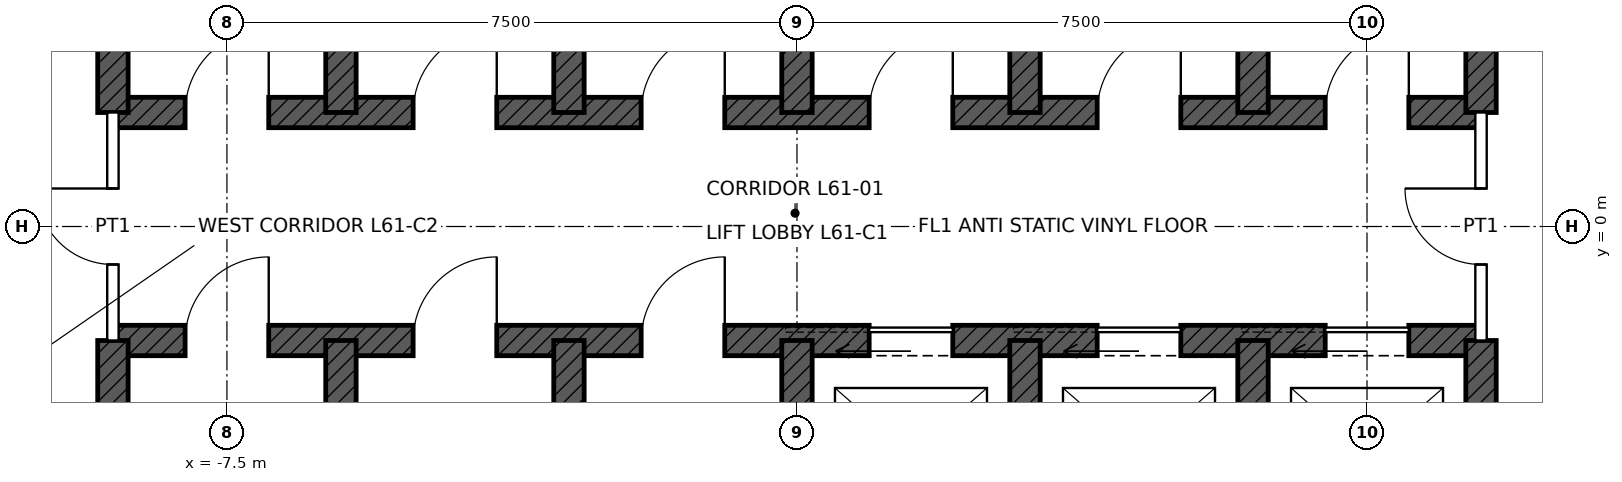
"""IFC4 building model, lengths in metres.
Left out: names, types, materials, properties, quantities, classifications, styles, units other than length and angle.
Written with IfcOpenShell. Run it as: python <this file> out.ifc"""

import sys

from ifc_helpers import new_model, si_unit, direction, frame, frame_2d, origin, place, context, subcontext, project, spatial, rectangle, extrude, element, fill, save


model = new_model("IFC4")
c1 = context("Model", 3, precision=1e-05, world=origin(), true_north=direction((0.0, 1.0)))
c2 = subcontext(c1, "Body", "Model", "MODEL_VIEW")
j1 = project(units=[si_unit("LENGTHUNIT", "METRE"), si_unit("PLANEANGLEUNIT", "RADIAN")], contexts=[c1])
p1 = place(None, origin())
s1 = spatial("IfcSite", under=j1, at=p1, CompositionType="ELEMENT")
p2 = place(p1, origin())
s2 = spatial("IfcBuilding", under=s1, at=p2, CompositionType="ELEMENT")
p3 = place(p2, frame((0.0, 0.0, 279.9)))
s3 = spatial("IfcBuildingStorey", under=s2, at=p3, CompositionType="ELEMENT", Elevation=279.9)
p4 = place(p3, frame((-9.0, 1.5, 0.0), z_axis=(0.0, 0.0, 1.0), x_axis=(1.0, 0.0, 0.0)))
e1 = element("IfcWall", 1, at=p4, inside=s3, PredefinedType="SHEAR", context=c2, shape_type="SweptSolid", body=[
    extrude(rectangle(XDim=18.0, YDim=0.4, at=frame_2d((9.0, 0.0))), origin(), (0.0, 0.0, 1.0), 4.0),
])
p5 = place(p4, frame((0.95, 0.0, 0.0)))
e2 = element("IfcOpeningElement", 2, at=p5, cuts=e1, PredefinedType="OPENING", context=c2, shape_type="SweptSolid", body=[
    extrude(rectangle(XDim=1.1, YDim=2.1, at=frame_2d((0.55, 1.05))), frame((0.0, 0.21, 0.0), z_axis=(0.0, -1.0, 0.0), x_axis=(1.0, 0.0, 0.0)), (0.0, 0.0, 1.0), 0.42),
])
p6 = place(p4, frame((3.95, 0.0, 0.0)))
e3 = element("IfcOpeningElement", 3, at=p6, cuts=e1, PredefinedType="OPENING", context=c2, shape_type="SweptSolid", body=[
    extrude(rectangle(XDim=1.1, YDim=2.1, at=frame_2d((0.55, 1.05))), frame((0.0, 0.21, 0.0), z_axis=(0.0, -1.0, 0.0), x_axis=(1.0, 0.0, 0.0)), (0.0, 0.0, 1.0), 0.42),
])
p7 = place(p4, frame((6.95, 0.0, 0.0)))
e4 = element("IfcOpeningElement", 4, at=p7, cuts=e1, PredefinedType="OPENING", context=c2, shape_type="SweptSolid", body=[
    extrude(rectangle(XDim=1.1, YDim=2.1, at=frame_2d((0.55, 1.05))), frame((0.0, 0.21, 0.0), z_axis=(0.0, -1.0, 0.0), x_axis=(1.0, 0.0, 0.0)), (0.0, 0.0, 1.0), 0.42),
])
p8 = place(p4, frame((9.95, 0.0, 0.0)))
e5 = element("IfcOpeningElement", 5, at=p8, cuts=e1, PredefinedType="OPENING", context=c2, shape_type="SweptSolid", body=[
    extrude(rectangle(XDim=1.1, YDim=2.1, at=frame_2d((0.55, 1.05))), frame((0.0, 0.21, 0.0), z_axis=(0.0, -1.0, 0.0), x_axis=(1.0, 0.0, 0.0)), (0.0, 0.0, 1.0), 0.42),
])
p9 = place(p4, frame((12.95, 0.0, 0.0)))
e6 = element("IfcOpeningElement", 6, at=p9, cuts=e1, PredefinedType="OPENING", context=c2, shape_type="SweptSolid", body=[
    extrude(rectangle(XDim=1.1, YDim=2.1, at=frame_2d((0.55, 1.05))), frame((0.0, 0.21, 0.0), z_axis=(0.0, -1.0, 0.0), x_axis=(1.0, 0.0, 0.0)), (0.0, 0.0, 1.0), 0.42),
])
p10 = place(p4, frame((15.95, 0.0, 0.0)))
e7 = element("IfcOpeningElement", 7, at=p10, cuts=e1, PredefinedType="OPENING", context=c2, shape_type="SweptSolid", body=[
    extrude(rectangle(XDim=1.1, YDim=2.1, at=frame_2d((0.55, 1.05))), frame((0.0, 0.21, 0.0), z_axis=(0.0, -1.0, 0.0), x_axis=(1.0, 0.0, 0.0)), (0.0, 0.0, 1.0), 0.42),
])
p11 = place(p3, frame((-9.0, -1.5, 0.0), z_axis=(0.0, 0.0, 1.0), x_axis=(1.0, 0.0, 0.0)))
e8 = element("IfcWall", 8, at=p11, inside=s3, PredefinedType="SHEAR", context=c2, shape_type="SweptSolid", body=[
    extrude(rectangle(XDim=18.0, YDim=0.4, at=frame_2d((9.0, 0.0))), origin(), (0.0, 0.0, 1.0), 4.0),
])
p12 = place(p11, frame((9.95, 0.0, 0.0)))
e9 = element("IfcOpeningElement", 9, at=p12, cuts=e8, PredefinedType="OPENING", context=c2, shape_type="SweptSolid", body=[
    extrude(rectangle(XDim=1.1, YDim=2.1, at=frame_2d((0.55, 1.05))), frame((0.0, 0.21, 0.0), z_axis=(0.0, -1.0, 0.0), x_axis=(1.0, 0.0, 0.0)), (0.0, 0.0, 1.0), 0.42),
])
p13 = place(p11, frame((12.95, 0.0, 0.0)))
e10 = element("IfcOpeningElement", 10, at=p13, cuts=e8, PredefinedType="OPENING", context=c2, shape_type="SweptSolid", body=[
    extrude(rectangle(XDim=1.1, YDim=2.1, at=frame_2d((0.55, 1.05))), frame((0.0, 0.21, 0.0), z_axis=(0.0, -1.0, 0.0), x_axis=(1.0, 0.0, 0.0)), (0.0, 0.0, 1.0), 0.42),
])
p14 = place(p11, frame((15.95, 0.0, 0.0)))
e11 = element("IfcOpeningElement", 11, at=p14, cuts=e8, PredefinedType="OPENING", context=c2, shape_type="SweptSolid", body=[
    extrude(rectangle(XDim=1.1, YDim=2.1, at=frame_2d((0.55, 1.05))), frame((0.0, 0.21, 0.0), z_axis=(0.0, -1.0, 0.0), x_axis=(1.0, 0.0, 0.0)), (0.0, 0.0, 1.0), 0.42),
])
p15 = place(p11, frame((0.95, 0.0, 0.0)))
e12 = element("IfcOpeningElement", 12, at=p15, cuts=e8, PredefinedType="OPENING", context=c2, shape_type="SweptSolid", body=[
    extrude(rectangle(XDim=1.1, YDim=2.1, at=frame_2d((0.55, 1.05))), frame((0.0, 0.21, 0.0), z_axis=(0.0, -1.0, 0.0), x_axis=(1.0, 0.0, 0.0)), (0.0, 0.0, 1.0), 0.42),
])
p16 = place(p11, frame((3.95, 0.0, 0.0)))
e13 = element("IfcOpeningElement", 13, at=p16, cuts=e8, PredefinedType="OPENING", context=c2, shape_type="SweptSolid", body=[
    extrude(rectangle(XDim=1.1, YDim=2.1, at=frame_2d((0.55, 1.05))), frame((0.0, 0.21, 0.0), z_axis=(0.0, -1.0, 0.0), x_axis=(1.0, 0.0, 0.0)), (0.0, 0.0, 1.0), 0.42),
])
p17 = place(p11, frame((6.95, 0.0, 0.0)))
e14 = element("IfcOpeningElement", 14, at=p17, cuts=e8, PredefinedType="OPENING", context=c2, shape_type="SweptSolid", body=[
    extrude(rectangle(XDim=1.1, YDim=2.1, at=frame_2d((0.55, 1.05))), frame((0.0, 0.21, 0.0), z_axis=(0.0, -1.0, 0.0), x_axis=(1.0, 0.0, 0.0)), (0.0, 0.0, 1.0), 0.42),
])
for number, where, z_axis, x_axis in (
    (15, (-9.0, 1.5, 0.0), (0.0, 0.0, 1.0), (0.0, 1.0, 0.0)),
    (16, (9.0, 1.5, 0.0), (0.0, 0.0, 1.0), (0.0, 1.0, 0.0)),
    (17, (-9.0, -4.5, 0.0), (0.0, 0.0, 1.0), (0.0, 1.0, 0.0)),
    (18, (9.0, -4.5, 0.0), (0.0, 0.0, 1.0), (0.0, 1.0, 0.0)),
    (19, (-6.0, 1.5, 0.0), (0.0, 0.0, 1.0), (0.0, 1.0, 0.0)),
    (20, (-3.0, 1.5, 0.0), (0.0, 0.0, 1.0), (0.0, 1.0, 0.0)),
    (21, (0.0, 1.5, 0.0), (0.0, 0.0, 1.0), (0.0, 1.0, 0.0)),
    (22, (3.0, 1.5, 0.0), (0.0, 0.0, 1.0), (0.0, 1.0, 0.0)),
    (23, (6.0, 1.5, 0.0), (0.0, 0.0, 1.0), (0.0, 1.0, 0.0)),
    (24, (-6.0, -4.5, 0.0), (0.0, 0.0, 1.0), (0.0, 1.0, 0.0)),
    (25, (-3.0, -4.5, 0.0), (0.0, 0.0, 1.0), (0.0, 1.0, 0.0)),
    (26, (0.0, -4.5, 0.0), (0.0, 0.0, 1.0), (0.0, 1.0, 0.0)),
    (27, (3.0, -4.5, 0.0), (0.0, 0.0, 1.0), (0.0, 1.0, 0.0)),
    (28, (6.0, -4.5, 0.0), (0.0, 0.0, 1.0), (0.0, 1.0, 0.0)),
):
    element("IfcWall", number, at=place(p3, frame(where, z_axis=z_axis, x_axis=x_axis)), inside=s3, PredefinedType="SHEAR", context=c2, shape_type="SweptSolid", body=[
        extrude(rectangle(XDim=3.0, YDim=0.4, at=frame_2d((1.5, 0.0))), origin(), (0.0, 0.0, 1.0), 4.0),
    ])
p18 = place(p3, frame((-9.0, -1.5, 0.0), z_axis=(0.0, 0.0, 1.0), x_axis=(0.0, 1.0, 0.0)))
e29 = element("IfcWall", 29, at=p18, inside=s3, PredefinedType="PARTITIONING", context=c2, shape_type="SweptSolid", body=[
    extrude(rectangle(XDim=3.0, YDim=0.15, at=frame_2d((1.5, 0.0))), origin(), (0.0, 0.0, 1.0), 3.75),
])
p19 = place(p18, frame((1.0, 0.0, 0.0)))
e30 = element("IfcOpeningElement", 30, at=p19, cuts=e29, PredefinedType="OPENING", context=c2, shape_type="SweptSolid", body=[
    extrude(rectangle(XDim=1.0, YDim=2.4, at=frame_2d((0.5, 1.2))), frame((0.0, 0.085, 0.0), z_axis=(0.0, -1.0, 0.0), x_axis=(1.0, 0.0, 0.0)), (0.0, 0.0, 1.0), 0.17),
])
p20 = place(p3, frame((9.0, -1.5, 0.0), z_axis=(0.0, 0.0, 1.0), x_axis=(0.0, 1.0, 0.0)))
e31 = element("IfcWall", 31, at=p20, inside=s3, PredefinedType="PARTITIONING", context=c2, shape_type="SweptSolid", body=[
    extrude(rectangle(XDim=3.0, YDim=0.15, at=frame_2d((1.5, 0.0))), origin(), (0.0, 0.0, 1.0), 3.75),
])
p21 = place(p20, frame((1.0, 0.0, 0.0)))
e32 = element("IfcOpeningElement", 32, at=p21, cuts=e31, PredefinedType="OPENING", context=c2, shape_type="SweptSolid", body=[
    extrude(rectangle(XDim=1.0, YDim=2.4, at=frame_2d((0.5, 1.2))), frame((0.0, 0.085, 0.0), z_axis=(0.0, -1.0, 0.0), x_axis=(1.0, 0.0, 0.0)), (0.0, 0.0, 1.0), 0.17),
])
p22 = place(p12, origin())
e33 = element("IfcDoor", 33, at=p22, inside=s3, OperationType="SLIDING_TO_LEFT", PredefinedType="DOOR", context=c2, shape_type="SweptSolid", body=[
    extrude(rectangle(XDim=1.1, YDim=2.1, at=frame_2d((0.55, 1.05))), frame((0.0, 0.025, 0.0), z_axis=(0.0, -1.0, 0.0), x_axis=(1.0, 0.0, 0.0)), (0.0, 0.0, 1.0), 0.05),
])
fill(e9, e33)
p23 = place(p13, origin())
e34 = element("IfcDoor", 34, at=p23, inside=s3, OperationType="SLIDING_TO_LEFT", PredefinedType="DOOR", context=c2, shape_type="SweptSolid", body=[
    extrude(rectangle(XDim=1.1, YDim=2.1, at=frame_2d((0.55, 1.05))), frame((0.0, 0.025, 0.0), z_axis=(0.0, -1.0, 0.0), x_axis=(1.0, 0.0, 0.0)), (0.0, 0.0, 1.0), 0.05),
])
fill(e10, e34)
p24 = place(p14, origin())
e35 = element("IfcDoor", 35, at=p24, inside=s3, OperationType="SLIDING_TO_LEFT", PredefinedType="DOOR", context=c2, shape_type="SweptSolid", body=[
    extrude(rectangle(XDim=1.1, YDim=2.1, at=frame_2d((0.55, 1.05))), frame((0.0, 0.025, 0.0), z_axis=(0.0, -1.0, 0.0), x_axis=(1.0, 0.0, 0.0)), (0.0, 0.0, 1.0), 0.05),
])
fill(e11, e35)
p25 = place(p19, origin())
e36 = element("IfcDoor", 36, at=p25, inside=s3, OperationType="SINGLE_SWING_RIGHT", PredefinedType="DOOR", context=c2, shape_type="SweptSolid", body=[
    extrude(rectangle(XDim=1.0, YDim=2.4, at=frame_2d((0.5, 1.2))), frame((0.0, 0.025, 0.0), z_axis=(0.0, -1.0, 0.0), x_axis=(1.0, 0.0, 0.0)), (0.0, 0.0, 1.0), 0.05),
])
fill(e30, e36)
p26 = place(p21, origin())
e37 = element("IfcDoor", 37, at=p26, inside=s3, OperationType="SINGLE_SWING_RIGHT", PredefinedType="DOOR", context=c2, shape_type="SweptSolid", body=[
    extrude(rectangle(XDim=1.0, YDim=2.4, at=frame_2d((0.5, 1.2))), frame((0.0, 0.025, 0.0), z_axis=(0.0, -1.0, 0.0), x_axis=(1.0, 0.0, 0.0)), (0.0, 0.0, 1.0), 0.05),
])
fill(e32, e37)
p27 = place(p5, origin())
e38 = element("IfcDoor", 38, at=p27, inside=s3, OperationType="SINGLE_SWING_RIGHT", PredefinedType="DOOR", context=c2, shape_type="SweptSolid", body=[
    extrude(rectangle(XDim=1.1, YDim=2.1, at=frame_2d((0.55, 1.05))), frame((0.0, 0.025, 0.0), z_axis=(0.0, -1.0, 0.0), x_axis=(1.0, 0.0, 0.0)), (0.0, 0.0, 1.0), 0.05),
])
fill(e2, e38)
p28 = place(p6, origin())
e39 = element("IfcDoor", 39, at=p28, inside=s3, OperationType="SINGLE_SWING_RIGHT", PredefinedType="DOOR", context=c2, shape_type="SweptSolid", body=[
    extrude(rectangle(XDim=1.1, YDim=2.1, at=frame_2d((0.55, 1.05))), frame((0.0, 0.025, 0.0), z_axis=(0.0, -1.0, 0.0), x_axis=(1.0, 0.0, 0.0)), (0.0, 0.0, 1.0), 0.05),
])
fill(e3, e39)
p29 = place(p7, origin())
e40 = element("IfcDoor", 40, at=p29, inside=s3, OperationType="SINGLE_SWING_RIGHT", PredefinedType="DOOR", context=c2, shape_type="SweptSolid", body=[
    extrude(rectangle(XDim=1.1, YDim=2.1, at=frame_2d((0.55, 1.05))), frame((0.0, 0.025, 0.0), z_axis=(0.0, -1.0, 0.0), x_axis=(1.0, 0.0, 0.0)), (0.0, 0.0, 1.0), 0.05),
])
fill(e4, e40)
p30 = place(p8, origin())
e41 = element("IfcDoor", 41, at=p30, inside=s3, OperationType="SINGLE_SWING_RIGHT", PredefinedType="DOOR", context=c2, shape_type="SweptSolid", body=[
    extrude(rectangle(XDim=1.1, YDim=2.1, at=frame_2d((0.55, 1.05))), frame((0.0, 0.025, 0.0), z_axis=(0.0, -1.0, 0.0), x_axis=(1.0, 0.0, 0.0)), (0.0, 0.0, 1.0), 0.05),
])
fill(e5, e41)
p31 = place(p9, origin())
e42 = element("IfcDoor", 42, at=p31, inside=s3, OperationType="SINGLE_SWING_RIGHT", PredefinedType="DOOR", context=c2, shape_type="SweptSolid", body=[
    extrude(rectangle(XDim=1.1, YDim=2.1, at=frame_2d((0.55, 1.05))), frame((0.0, 0.025, 0.0), z_axis=(0.0, -1.0, 0.0), x_axis=(1.0, 0.0, 0.0)), (0.0, 0.0, 1.0), 0.05),
])
fill(e6, e42)
p32 = place(p10, origin())
e43 = element("IfcDoor", 43, at=p32, inside=s3, OperationType="SINGLE_SWING_RIGHT", PredefinedType="DOOR", context=c2, shape_type="SweptSolid", body=[
    extrude(rectangle(XDim=1.1, YDim=2.1, at=frame_2d((0.55, 1.05))), frame((0.0, 0.025, 0.0), z_axis=(0.0, -1.0, 0.0), x_axis=(1.0, 0.0, 0.0)), (0.0, 0.0, 1.0), 0.05),
])
fill(e7, e43)
p33 = place(p15, origin())
e44 = element("IfcDoor", 44, at=p33, inside=s3, OperationType="SINGLE_SWING_RIGHT", PredefinedType="DOOR", context=c2, shape_type="SweptSolid", body=[
    extrude(rectangle(XDim=1.1, YDim=2.1, at=frame_2d((0.55, 1.05))), frame((0.0, 0.025, 0.0), z_axis=(0.0, -1.0, 0.0), x_axis=(1.0, 0.0, 0.0)), (0.0, 0.0, 1.0), 0.05),
])
fill(e12, e44)
p34 = place(p16, origin())
e45 = element("IfcDoor", 45, at=p34, inside=s3, OperationType="SINGLE_SWING_RIGHT", PredefinedType="DOOR", context=c2, shape_type="SweptSolid", body=[
    extrude(rectangle(XDim=1.1, YDim=2.1, at=frame_2d((0.55, 1.05))), frame((0.0, 0.025, 0.0), z_axis=(0.0, -1.0, 0.0), x_axis=(1.0, 0.0, 0.0)), (0.0, 0.0, 1.0), 0.05),
])
fill(e13, e45)
p35 = place(p17, origin())
e46 = element("IfcDoor", 46, at=p35, inside=s3, OperationType="SINGLE_SWING_RIGHT", PredefinedType="DOOR", context=c2, shape_type="SweptSolid", body=[
    extrude(rectangle(XDim=1.1, YDim=2.1, at=frame_2d((0.55, 1.05))), frame((0.0, 0.025, 0.0), z_axis=(0.0, -1.0, 0.0), x_axis=(1.0, 0.0, 0.0)), (0.0, 0.0, 1.0), 0.05),
])
fill(e14, e46)
save(model, sys.argv[1])
